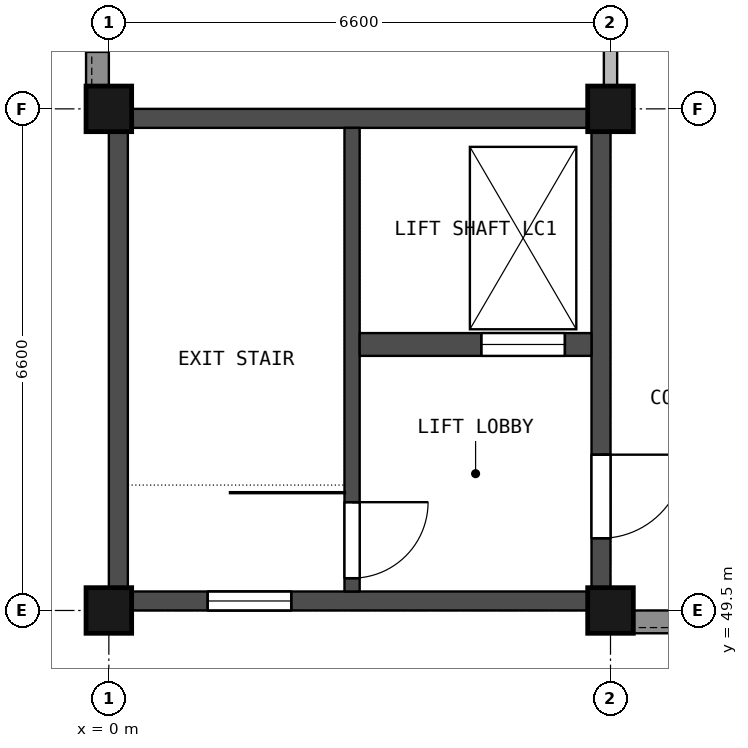
"""IFC4 building model, lengths in metres.
Left out: names, types, materials, properties, quantities, classifications, styles, units other than length and angle.
Written with IfcOpenShell. Run it as: python <this file> out.ifc"""

import sys

from ifc_helpers import new_model, si_unit, direction, frame, frame_2d, origin, origin_2d, place, context, subcontext, project, spatial, rectangle, extrude, element, fill, save


model = new_model("IFC4")
c1 = context("Model", 3, precision=1e-05, world=origin(), true_north=direction((0.0, 1.0)))
c2 = subcontext(c1, "Body", "Model", "MODEL_VIEW")
j1 = project(units=[si_unit("LENGTHUNIT", "METRE"), si_unit("PLANEANGLEUNIT", "RADIAN")], contexts=[c1])
p1 = place(None, origin())
s1 = spatial("IfcSite", under=j1, at=p1, CompositionType="ELEMENT")
p2 = place(p1, origin())
s2 = spatial("IfcBuilding", under=s1, at=p2, CompositionType="ELEMENT")
p3 = place(p2, frame((0.0, 0.0, 9.9)))
s3 = spatial("IfcBuildingStorey", under=s2, at=p3, CompositionType="ELEMENT", Elevation=9.9)
for number, where, z_axis, x_axis in (
    (1, (0.0, 49.5, 0.0), (0.0, 0.0, 1.0), (1.0, 0.0, 0.0)),
    (2, (0.0, 56.1, 0.0), (0.0, 0.0, 1.0), (1.0, 0.0, 0.0)),
    (3, (6.6, 49.5, 0.0), (0.0, 0.0, 1.0), (1.0, 0.0, 0.0)),
    (4, (6.6, 56.1, 0.0), (0.0, 0.0, 1.0), (1.0, 0.0, 0.0)),
):
    element("IfcColumn", number, at=place(p3, frame(where, z_axis=z_axis, x_axis=x_axis)), inside=s3, PredefinedType="COLUMN", context=c2, shape_type="SweptSolid", body=[
        extrude(rectangle(XDim=0.6, YDim=0.6, at=origin_2d()), origin(), (0.0, 0.0, 1.0), 4.5),
    ])
p4 = place(p3, frame((6.475, 49.5, 0.0), z_axis=(0.0, 0.0, 1.0), x_axis=(0.0, 1.0, 0.0)))
e5 = element("IfcWall", 5, at=p4, inside=s3, PredefinedType="SHEAR", context=c2, shape_type="SweptSolid", body=[
    extrude(rectangle(XDim=6.6, YDim=0.25, at=frame_2d((3.3, 0.0))), origin(), (0.0, 0.0, 1.0), 4.25),
])
p5 = place(p4, frame((0.95, 0.0, 0.0)))
e6 = element("IfcOpeningElement", 6, at=p5, cuts=e5, PredefinedType="OPENING", context=c2, shape_type="SweptSolid", body=[
    extrude(rectangle(XDim=1.1, YDim=2.1, at=frame_2d((0.55, 1.05))), frame((0.0, 0.135, 0.0), z_axis=(0.0, -1.0, 0.0), x_axis=(1.0, 0.0, 0.0)), (0.0, 0.0, 1.0), 0.27),
])
p6 = place(p3, frame((0.125, 49.5, 0.0), z_axis=(0.0, 0.0, 1.0), x_axis=(0.0, 1.0, 0.0)))
e7 = element("IfcWall", 7, at=p6, inside=s3, PredefinedType="SHEAR", context=c2, shape_type="SweptSolid", body=[
    extrude(rectangle(XDim=6.6, YDim=0.25, at=frame_2d((3.3, 0.0))), origin(), (0.0, 0.0, 1.0), 4.25),
])
p7 = place(p3, frame((6.35, 49.625, 0.0), z_axis=(0.0, 0.0, 1.0), x_axis=(-1.0, 0.0, 0.0)))
e8 = element("IfcWall", 8, at=p7, inside=s3, PredefinedType="SHEAR", context=c2, shape_type="SweptSolid", body=[
    extrude(rectangle(XDim=6.1, YDim=0.25, at=frame_2d((3.05, 0.0))), origin(), (0.0, 0.0, 1.0), 4.25),
])
p8 = place(p7, frame((3.95, 0.0, 0.7)))
e9 = element("IfcOpeningElement", 9, at=p8, cuts=e8, PredefinedType="OPENING", context=c2, shape_type="SweptSolid", body=[
    extrude(rectangle(XDim=1.1, YDim=1.5, at=frame_2d((0.55, 0.75))), frame((0.0, 0.135, 0.0), z_axis=(0.0, -1.0, 0.0), x_axis=(1.0, 0.0, 0.0)), (0.0, 0.0, 1.0), 0.27),
])
p9 = place(p3, frame((6.35, 55.975, 0.0), z_axis=(0.0, 0.0, 1.0), x_axis=(-1.0, 0.0, 0.0)))
e10 = element("IfcWall", 10, at=p9, inside=s3, PredefinedType="SHEAR", context=c2, shape_type="SweptSolid", body=[
    extrude(rectangle(XDim=6.1, YDim=0.25, at=frame_2d((3.05, 0.0))), origin(), (0.0, 0.0, 1.0), 4.25),
])
p10 = place(p3, frame((3.2, 49.75, 0.0), z_axis=(0.0, 0.0, 1.0), x_axis=(0.0, 1.0, 0.0)))
e11 = element("IfcWall", 11, at=p10, inside=s3, PredefinedType="SHEAR", context=c2, shape_type="SweptSolid", body=[
    extrude(rectangle(XDim=6.1, YDim=0.2, at=frame_2d((3.05, 0.0))), origin(), (0.0, 0.0, 1.0), 4.25),
])
p11 = place(p10, frame((0.175, 0.0, 0.0)))
e12 = element("IfcOpeningElement", 12, at=p11, cuts=e11, PredefinedType="OPENING", context=c2, shape_type="SweptSolid", body=[
    extrude(rectangle(XDim=1.0, YDim=2.1, at=frame_2d((0.5, 1.05))), frame((0.0, 0.11, 0.0), z_axis=(0.0, -1.0, 0.0), x_axis=(1.0, 0.0, 0.0)), (0.0, 0.0, 1.0), 0.22),
])
p12 = place(p3, frame((6.35, 53.0, 0.0), z_axis=(0.0, 0.0, 1.0), x_axis=(-1.0, 0.0, 0.0)))
e13 = element("IfcWall", 13, at=p12, inside=s3, PredefinedType="SHEAR", context=c2, shape_type="SweptSolid", body=[
    extrude(rectangle(XDim=3.05, YDim=0.3, at=frame_2d((1.525, 0.0))), origin(), (0.0, 0.0, 1.0), 4.25),
])
p13 = place(p12, frame((0.35, 0.0, 0.0)))
e14 = element("IfcOpeningElement", 14, at=p13, cuts=e13, PredefinedType="OPENING", context=c2, shape_type="SweptSolid", body=[
    extrude(rectangle(XDim=1.1, YDim=2.2, at=frame_2d((0.55, 1.1))), frame((0.0, 0.16, 0.0), z_axis=(0.0, -1.0, 0.0), x_axis=(1.0, 0.0, 0.0)), (0.0, 0.0, 1.0), 0.32),
])
p14 = place(p3, frame((12.9, 49.35, 0.0), z_axis=(0.0, 0.0, 1.0), x_axis=(-1.0, 0.0, 0.0)))
e15 = element("IfcWall", 15, at=p14, inside=s3, PredefinedType="STANDARD", context=c2, shape_type="SweptSolid", body=[
    extrude(rectangle(XDim=6.0, YDim=0.3, at=frame_2d((3.0, 0.0))), origin(), (0.0, 0.0, 1.0), 3.35),
])
p15 = place(p14, frame((4.05, 0.0, 1.1)))
e16 = element("IfcOpeningElement", 16, at=p15, cuts=e15, PredefinedType="OPENING", context=c2, shape_type="SweptSolid", body=[
    extrude(rectangle(XDim=1.2, YDim=1.2, at=frame_2d((0.6, 0.6))), frame((0.0, 0.16, 0.0), z_axis=(0.0, -1.0, 0.0), x_axis=(1.0, 0.0, 0.0)), (0.0, 0.0, 1.0), 0.32),
])
p16 = place(p3, frame((-0.15, 56.4, 0.0), z_axis=(0.0, 0.0, 1.0), x_axis=(0.0, 1.0, 0.0)))
e17 = element("IfcWall", 17, at=p16, inside=s3, PredefinedType="STANDARD", context=c2, shape_type="SweptSolid", body=[
    extrude(rectangle(XDim=6.0, YDim=0.3, at=frame_2d((3.0, 0.0))), origin(), (0.0, 0.0, 1.0), 3.35),
])
p17 = place(p16, frame((0.45, 0.0, 0.9)))
e18 = element("IfcOpeningElement", 18, at=p17, cuts=e17, PredefinedType="OPENING", context=c2, shape_type="SweptSolid", body=[
    extrude(rectangle(XDim=1.8, YDim=1.5, at=frame_2d((0.9, 0.75))), frame((0.0, 0.16, 0.0), z_axis=(0.0, -1.0, 0.0), x_axis=(1.0, 0.0, 0.0)), (0.0, 0.0, 1.0), 0.32),
])
p18 = place(p16, frame((3.75, 0.0, 0.9)))
e19 = element("IfcOpeningElement", 19, at=p18, cuts=e17, PredefinedType="OPENING", context=c2, shape_type="SweptSolid", body=[
    extrude(rectangle(XDim=1.8, YDim=1.5, at=frame_2d((0.9, 0.75))), frame((0.0, 0.16, 0.0), z_axis=(0.0, -1.0, 0.0), x_axis=(1.0, 0.0, 0.0)), (0.0, 0.0, 1.0), 0.32),
])
p19 = place(p3, frame((6.6, 56.4, 0.0), z_axis=(0.0, 0.0, 1.0), x_axis=(0.0, 1.0, 0.0)))
e20 = element("IfcWall", 20, at=p19, inside=s3, PredefinedType="PARTITIONING", context=c2, shape_type="SweptSolid", body=[
    extrude(rectangle(XDim=6.0, YDim=0.175, at=frame_2d((3.0, 0.0))), origin(), (0.0, 0.0, 1.0), 3.35),
])
p20 = place(p19, frame((2.5, 0.0, 0.0)))
e21 = element("IfcOpeningElement", 21, at=p20, cuts=e20, PredefinedType="OPENING", context=c2, shape_type="SweptSolid", body=[
    extrude(rectangle(XDim=1.0, YDim=2.1, at=frame_2d((0.5, 1.05))), frame((0.0, 0.097, 0.0), z_axis=(0.0, -1.0, 0.0), x_axis=(1.0, 0.0, 0.0)), (0.0, 0.0, 1.0), 0.195),
])
p21 = place(p5, origin())
e22 = element("IfcDoor", 22, at=p21, inside=s3, OperationType="SINGLE_SWING_RIGHT", PredefinedType="DOOR", context=c2, shape_type="SweptSolid", body=[
    extrude(rectangle(XDim=1.1, YDim=2.1, at=frame_2d((0.55, 1.05))), frame((0.0, 0.025, 0.0), z_axis=(0.0, -1.0, 0.0), x_axis=(1.0, 0.0, 0.0)), (0.0, 0.0, 1.0), 0.05),
])
fill(e6, e22)
p22 = place(p11, origin())
e23 = element("IfcDoor", 23, at=p22, inside=s3, OperationType="SINGLE_SWING_RIGHT", PredefinedType="DOOR", context=c2, shape_type="SweptSolid", body=[
    extrude(rectangle(XDim=1.0, YDim=2.1, at=frame_2d((0.5, 1.05))), frame((0.0, 0.025, 0.0), z_axis=(0.0, -1.0, 0.0), x_axis=(1.0, 0.0, 0.0)), (0.0, 0.0, 1.0), 0.05),
])
fill(e12, e23)
p23 = place(p13, origin())
e24 = element("IfcDoor", 24, at=p23, inside=s3, OperationType="DOUBLE_DOOR_SLIDING", PredefinedType="NOTDEFINED", context=c2, shape_type="SweptSolid", body=[
    extrude(rectangle(XDim=1.1, YDim=2.2, at=frame_2d((0.55, 1.1))), frame((0.0, 0.025, 0.0), z_axis=(0.0, -1.0, 0.0), x_axis=(1.0, 0.0, 0.0)), (0.0, 0.0, 1.0), 0.05),
])
fill(e14, e24)
p24 = place(p8, origin())
e25 = element("IfcWindow", 25, at=p24, inside=s3, PartitioningType="SINGLE_PANEL", PredefinedType="WINDOW", context=c2, shape_type="SweptSolid", body=[
    extrude(rectangle(XDim=1.1, YDim=1.5, at=frame_2d((0.55, 0.75))), frame((0.0, 0.03, 0.0), z_axis=(0.0, -1.0, 0.0), x_axis=(1.0, 0.0, 0.0)), (0.0, 0.0, 1.0), 0.06),
])
fill(e9, e25)
p25 = place(p17, origin())
e26 = element("IfcWindow", 26, at=p25, inside=s3, PartitioningType="SINGLE_PANEL", PredefinedType="WINDOW", context=c2, shape_type="SweptSolid", body=[
    extrude(rectangle(XDim=1.8, YDim=1.5, at=frame_2d((0.9, 0.75))), frame((0.0, 0.03, 0.0), z_axis=(0.0, -1.0, 0.0), x_axis=(1.0, 0.0, 0.0)), (0.0, 0.0, 1.0), 0.06),
])
fill(e18, e26)
save(model, sys.argv[1])
